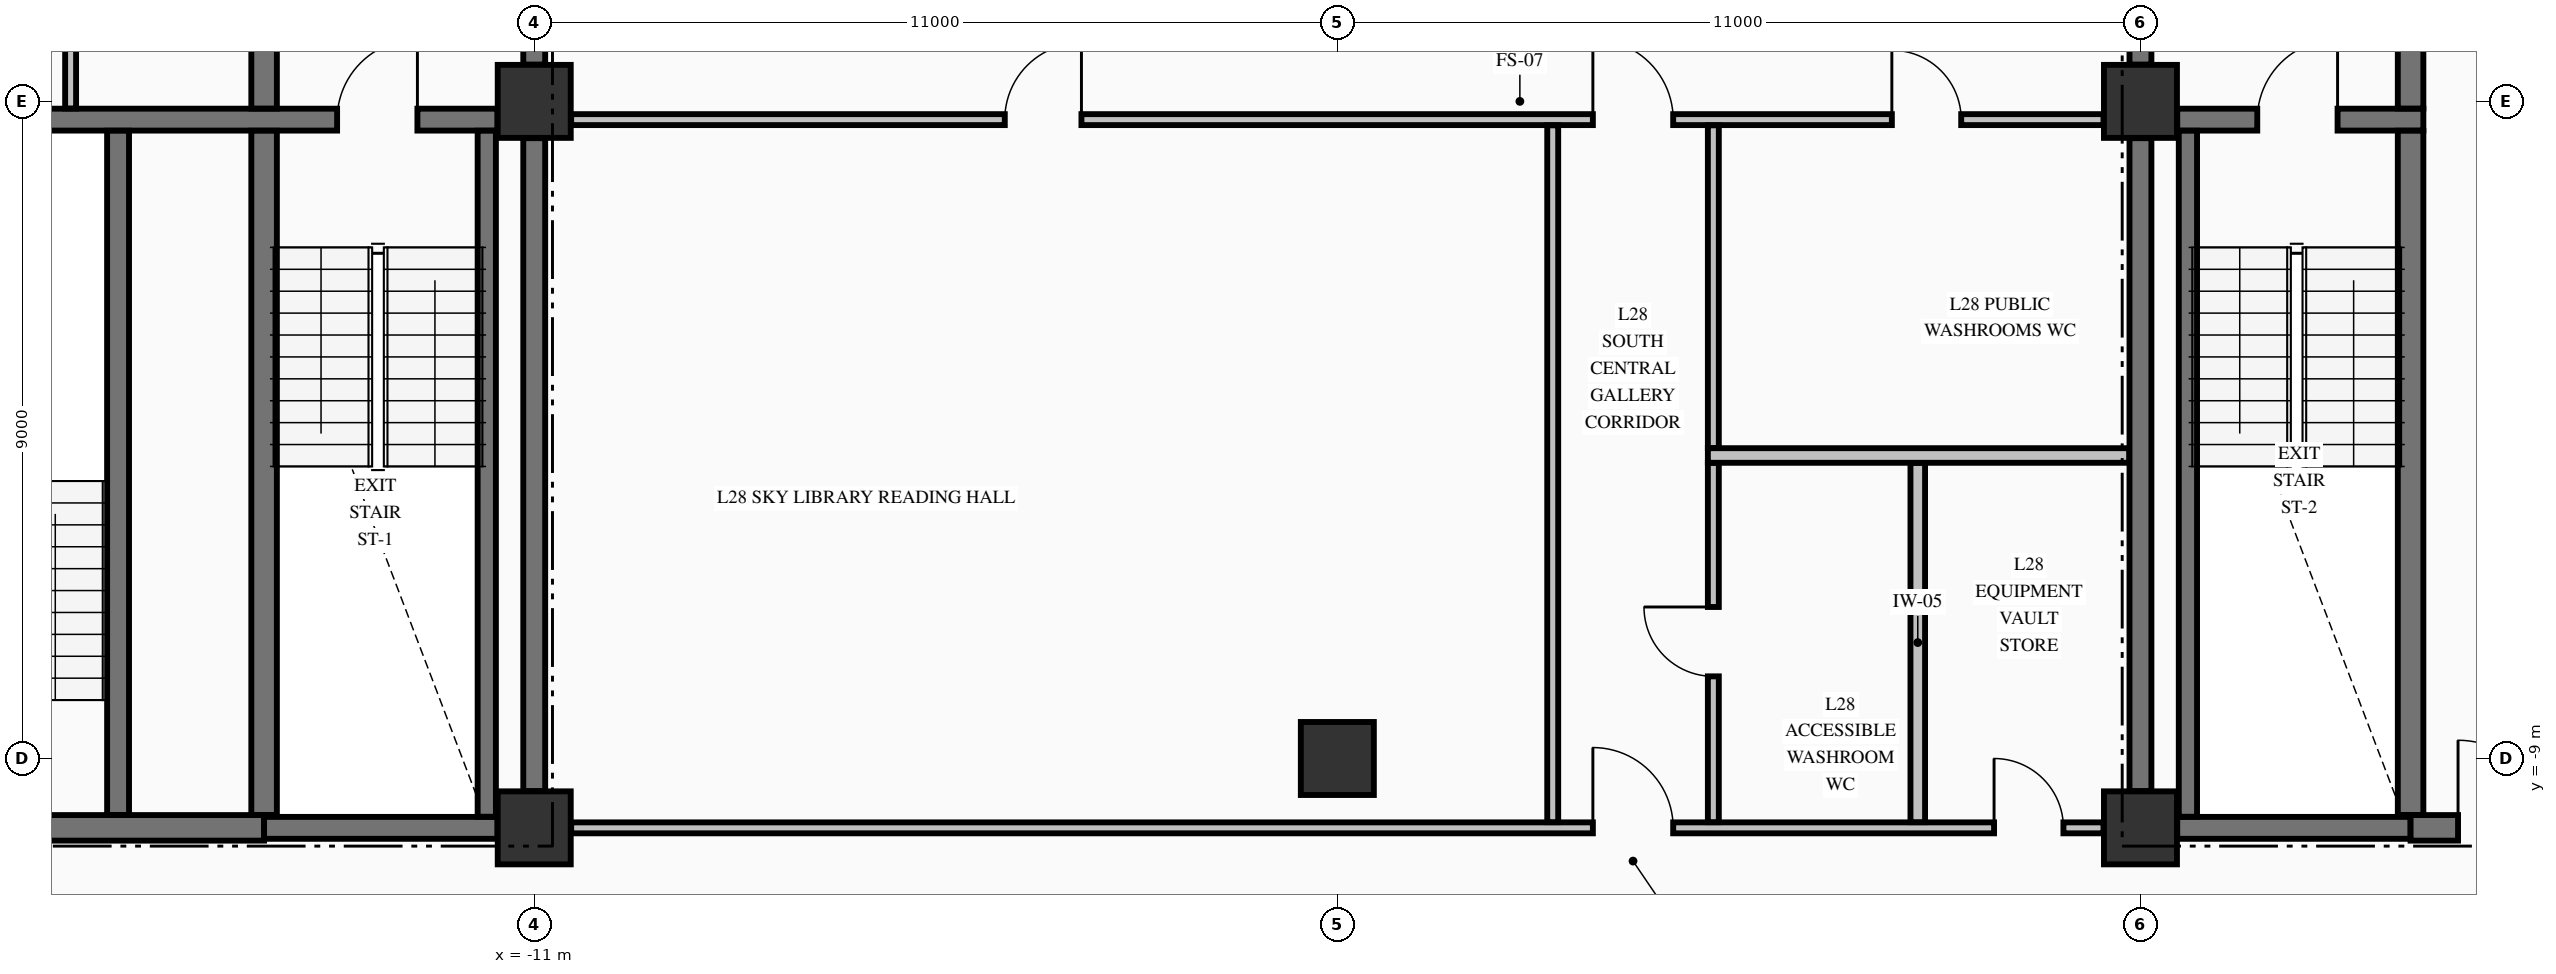
"""IFC4 building model, lengths in metres.
Left out: names, types, materials, properties, quantities, classifications, styles, units other than length and angle.
Written with IfcOpenShell. Run it as: python <this file> out.ifc"""

import sys

from ifc_helpers import new_model, si_unit, direction, frame, frame_2d, origin, origin_2d, place, context, subcontext, project, spatial, rectangle, extrude, element, fill, save


model = new_model("IFC4")
c1 = context("Model", 3, precision=1e-05, world=origin(), true_north=direction((0.0, 1.0)))
c2 = subcontext(c1, "Body", "Model", "MODEL_VIEW")
j1 = project(units=[si_unit("LENGTHUNIT", "METRE"), si_unit("PLANEANGLEUNIT", "RADIAN")], contexts=[c1])
p1 = place(None, origin())
s1 = spatial("IfcSite", under=j1, at=p1, CompositionType="ELEMENT")
p2 = place(p1, origin())
s2 = spatial("IfcBuilding", under=s1, at=p2, CompositionType="ELEMENT")
p3 = place(p2, frame((0.0, 0.0, 112.78)))
s3 = spatial("IfcBuildingStorey", under=s2, at=p3, CompositionType="ELEMENT", Elevation=112.78)
for number, where, z_axis, x_axis in (
    (1, (-11.0, -9.95, -0.25), (0.0, 0.0, 1.0), (1.0, 0.0, 0.0)),
    (2, (-11.0, 0.0, -0.25), (0.0, 0.0, 1.0), (1.0, 0.0, 0.0)),
    (3, (11.0, -9.95, -0.25), (0.0, 0.0, 1.0), (1.0, 0.0, 0.0)),
    (4, (11.0, 0.0, -0.25), (0.0, 0.0, 1.0), (1.0, 0.0, 0.0)),
    (5, (0.0, -9.0, -0.25), (0.0, 0.0, 1.0), (1.0, 0.0, 0.0)),
):
    element("IfcColumn", number, at=place(p3, frame(where, z_axis=z_axis, x_axis=x_axis)), inside=s3, PredefinedType="COLUMN", context=c2, shape_type="SweptSolid", body=[
        extrude(rectangle(XDim=1.0, YDim=1.0, at=origin_2d()), origin(), (0.0, 0.0, 1.0), 3.395),
    ])
p4 = place(p3, frame((-19.496, -9.95, 0.0), z_axis=(0.0, 0.0, 1.0), x_axis=(1.0, 0.0, 0.0)))
e6 = element("IfcWall", 6, at=p4, inside=s3, PredefinedType="SHEAR", context=c2, shape_type="SweptSolid", body=[
    extrude(rectangle(XDim=4.796, YDim=0.35, at=frame_2d((2.398, 0.0))), origin(), (0.0, 0.0, 1.0), 3.145),
])
p5 = place(p4, frame((0.671, 0.0, 0.0)))
e7 = element("IfcOpeningElement", 7, at=p5, cuts=e6, PredefinedType="OPENING", context=c2, shape_type="SweptSolid", body=[
    extrude(rectangle(XDim=1.05, YDim=2.15, at=frame_2d((0.525, 1.075))), frame((0.0, 0.185, 0.0), z_axis=(0.0, -1.0, 0.0), x_axis=(1.0, 0.0, 0.0)), (0.0, 0.0, 1.0), 0.37),
])
for number, where, z_axis, x_axis in (
    (8, (-14.7, -9.95, 0.0), (0.0, 0.0, 1.0), (1.0, 0.0, 0.0)),
    (9, (11.504, -9.95, 0.0), (0.0, 0.0, 1.0), (1.0, 0.0, 0.0)),
):
    element("IfcWall", number, at=place(p3, frame(where, z_axis=z_axis, x_axis=x_axis)), inside=s3, PredefinedType="SHEAR", context=c2, shape_type="SweptSolid", body=[
        extrude(rectangle(XDim=3.196, YDim=0.3, at=frame_2d((1.598, 0.0))), origin(), (0.0, 0.0, 1.0), 3.145),
    ])
p6 = place(p3, frame((14.7, -9.95, 0.0), z_axis=(0.0, 0.0, 1.0), x_axis=(1.0, 0.0, 0.0)))
e10 = element("IfcWall", 10, at=p6, inside=s3, PredefinedType="SHEAR", context=c2, shape_type="SweptSolid", body=[
    extrude(rectangle(XDim=4.796, YDim=0.35, at=frame_2d((2.398, 0.0))), origin(), (0.0, 0.0, 1.0), 3.145),
])
p7 = place(p6, frame((0.65, 0.0, 0.0)))
e11 = element("IfcOpeningElement", 11, at=p7, cuts=e10, PredefinedType="OPENING", context=c2, shape_type="SweptSolid", body=[
    extrude(rectangle(XDim=1.2, YDim=2.15, at=frame_2d((0.6, 1.075))), frame((0.0, 0.185, 0.0), z_axis=(0.0, -1.0, 0.0), x_axis=(1.0, 0.0, 0.0)), (0.0, 0.0, 1.0), 0.37),
])
p8 = place(p3, frame((-19.496, -0.25, 0.0), z_axis=(0.0, 0.0, 1.0), x_axis=(1.0, 0.0, 0.0)))
e12 = element("IfcWall", 12, at=p8, inside=s3, PredefinedType="SHEAR", context=c2, shape_type="SweptSolid", body=[
    extrude(rectangle(XDim=7.992, YDim=0.3, at=frame_2d((3.996, 0.0))), origin(), (0.0, 0.0, 1.0), 3.145),
])
p9 = place(p8, frame((5.796, 0.0, 0.0)))
e13 = element("IfcOpeningElement", 13, at=p9, cuts=e12, PredefinedType="OPENING", context=c2, shape_type="SweptSolid", body=[
    extrude(rectangle(XDim=1.1, YDim=2.15, at=frame_2d((0.55, 1.075))), frame((0.0, 0.16, 0.0), z_axis=(0.0, -1.0, 0.0), x_axis=(1.0, 0.0, 0.0)), (0.0, 0.0, 1.0), 0.32),
])
p10 = place(p3, frame((11.504, -0.25, 0.0), z_axis=(0.0, 0.0, 1.0), x_axis=(1.0, 0.0, 0.0)))
e14 = element("IfcWall", 14, at=p10, inside=s3, PredefinedType="SHEAR", context=c2, shape_type="SweptSolid", body=[
    extrude(rectangle(XDim=3.371, YDim=0.3, at=frame_2d((1.686, 0.0))), origin(), (0.0, 0.0, 1.0), 3.145),
])
p11 = place(p10, frame((1.096, 0.0, 0.0)))
e15 = element("IfcOpeningElement", 15, at=p11, cuts=e14, PredefinedType="OPENING", context=c2, shape_type="SweptSolid", body=[
    extrude(rectangle(XDim=1.1, YDim=2.15, at=frame_2d((0.55, 1.075))), frame((0.0, 0.16, 0.0), z_axis=(0.0, -1.0, 0.0), x_axis=(1.0, 0.0, 0.0)), (0.0, 0.0, 1.0), 0.32),
])
p12 = place(p3, frame((-10.494, -9.95, 0.0), z_axis=(0.0, 0.0, 1.0), x_axis=(1.0, 0.0, 0.0)))
e16 = element("IfcWall", 16, at=p12, inside=s3, PredefinedType="PARTITIONING", context=c2, shape_type="SweptSolid", body=[
    extrude(rectangle(XDim=20.988, YDim=0.15, at=frame_2d((10.494, 0.0))), origin(), (0.0, 0.0, 1.0), 3.145),
])
p13 = place(p12, frame((13.994, 0.0, 0.0)))
e17 = element("IfcOpeningElement", 17, at=p13, cuts=e16, PredefinedType="OPENING", context=c2, shape_type="SweptSolid", body=[
    extrude(rectangle(XDim=1.1, YDim=2.15, at=frame_2d((0.55, 1.075))), frame((0.0, 0.085, 0.0), z_axis=(0.0, -1.0, 0.0), x_axis=(1.0, 0.0, 0.0)), (0.0, 0.0, 1.0), 0.17),
])
p14 = place(p12, frame((19.489, 0.0, 0.0)))
e18 = element("IfcOpeningElement", 18, at=p14, cuts=e16, PredefinedType="OPENING", context=c2, shape_type="SweptSolid", body=[
    extrude(rectangle(XDim=0.95, YDim=2.15, at=frame_2d((0.475, 1.075))), frame((0.0, 0.085, 0.0), z_axis=(0.0, -1.0, 0.0), x_axis=(1.0, 0.0, 0.0)), (0.0, 0.0, 1.0), 0.17),
])
p15 = place(p3, frame((5.075, -4.85, 0.0), z_axis=(0.0, 0.0, 1.0), x_axis=(1.0, 0.0, 0.0)))
e19 = element("IfcWall", 19, at=p15, inside=s3, PredefinedType="PARTITIONING", context=c2, shape_type="SweptSolid", body=[
    extrude(rectangle(XDim=5.772, YDim=0.2, at=frame_2d((2.886, 0.0))), origin(), (0.0, 0.0, 1.0), 3.145),
])
p16 = place(p3, frame((-10.494, -0.25, 0.0), z_axis=(0.0, 0.0, 1.0), x_axis=(1.0, 0.0, 0.0)))
e20 = element("IfcWall", 20, at=p16, inside=s3, PredefinedType="PARTITIONING", context=c2, shape_type="SweptSolid", body=[
    extrude(rectangle(XDim=20.988, YDim=0.15, at=frame_2d((10.494, 0.0))), origin(), (0.0, 0.0, 1.0), 3.145),
])
p17 = place(p16, frame((13.994, 0.0, 0.0)))
e21 = element("IfcOpeningElement", 21, at=p17, cuts=e20, PredefinedType="OPENING", context=c2, shape_type="SweptSolid", body=[
    extrude(rectangle(XDim=1.1, YDim=2.15, at=frame_2d((0.55, 1.075))), frame((0.0, 0.085, 0.0), z_axis=(0.0, -1.0, 0.0), x_axis=(1.0, 0.0, 0.0)), (0.0, 0.0, 1.0), 0.17),
])
p18 = place(p16, frame((5.939, 0.0, 0.0)))
e22 = element("IfcOpeningElement", 22, at=p18, cuts=e20, PredefinedType="OPENING", context=c2, shape_type="SweptSolid", body=[
    extrude(rectangle(XDim=1.05, YDim=2.15, at=frame_2d((0.525, 1.075))), frame((0.0, 0.085, 0.0), z_axis=(0.0, -1.0, 0.0), x_axis=(1.0, 0.0, 0.0)), (0.0, 0.0, 1.0), 0.17),
])
p19 = place(p16, frame((18.089, 0.0, 0.0)))
e23 = element("IfcOpeningElement", 23, at=p19, cuts=e20, PredefinedType="OPENING", context=c2, shape_type="SweptSolid", body=[
    extrude(rectangle(XDim=0.95, YDim=2.15, at=frame_2d((0.475, 1.075))), frame((0.0, 0.085, 0.0), z_axis=(0.0, -1.0, 0.0), x_axis=(1.0, 0.0, 0.0)), (0.0, 0.0, 1.0), 0.17),
])
p20 = place(p3, frame((-16.7, -9.773, 0.0), z_axis=(0.0, 0.0, 1.0), x_axis=(0.0, 1.0, 0.0)))
e24 = element("IfcWall", 24, at=p20, inside=s3, PredefinedType="SHEAR", context=c2, shape_type="SweptSolid", body=[
    extrude(rectangle(XDim=9.371, YDim=0.3, at=frame_2d((4.686, 0.0))), origin(), (0.0, 0.0, 1.0), 3.145),
])
p21 = place(p3, frame((-14.7, -9.773, 0.0), z_axis=(0.0, 0.0, 1.0), x_axis=(0.0, 1.0, 0.0)))
e25 = element("IfcWall", 25, at=p21, inside=s3, PredefinedType="SHEAR", context=c2, shape_type="SweptSolid", body=[
    extrude(rectangle(XDim=9.371, YDim=0.35, at=frame_2d((4.686, 0.0))), origin(), (0.0, 0.0, 1.0), 3.145),
])
p22 = place(p3, frame((-14.7, -0.098, 0.0), z_axis=(0.0, 0.0, 1.0), x_axis=(0.0, 1.0, 0.0)))
e26 = element("IfcWall", 26, at=p22, inside=s3, PredefinedType="SHEAR", context=c2, shape_type="SweptSolid", body=[
    extrude(rectangle(XDim=2.846, YDim=0.35, at=frame_2d((1.423, 0.0))), origin(), (0.0, 0.0, 1.0), 3.145),
])
p23 = place(p3, frame((-11.65, -9.798, 0.0), z_axis=(0.0, 0.0, 1.0), x_axis=(0.0, 1.0, 0.0)))
e27 = element("IfcWall", 27, at=p23, inside=s3, PredefinedType="SOLIDWALL", context=c2, shape_type="SweptSolid", body=[
    extrude(rectangle(XDim=9.396, YDim=0.25, at=frame_2d((4.698, 0.0))), origin(), (0.0, 0.0, 1.0), 3.145),
])
p24 = place(p3, frame((-11.0, -9.446, 0.0), z_axis=(0.0, 0.0, 1.0), x_axis=(0.0, 1.0, 0.0)))
e28 = element("IfcWall", 28, at=p24, inside=s3, PredefinedType="SHEAR", context=c2, shape_type="SweptSolid", body=[
    extrude(rectangle(XDim=8.942, YDim=0.3, at=frame_2d((4.471, 0.0))), origin(), (0.0, 0.0, 1.0), 3.145),
])
p25 = place(p3, frame((-11.0, 0.504, 0.0), z_axis=(0.0, 0.0, 1.0), x_axis=(0.0, 1.0, 0.0)))
e29 = element("IfcWall", 29, at=p25, inside=s3, PredefinedType="SHEAR", context=c2, shape_type="SweptSolid", body=[
    extrude(rectangle(XDim=2.244, YDim=0.3, at=frame_2d((1.122, 0.0))), origin(), (0.0, 0.0, 1.0), 3.145),
])
p26 = place(p25, frame((0.596, 0.0, 0.0)))
e30 = element("IfcOpeningElement", 30, at=p26, cuts=e29, PredefinedType="OPENING", context=c2, shape_type="SweptSolid", body=[
    extrude(rectangle(XDim=1.1, YDim=2.15, at=frame_2d((0.55, 1.075))), frame((0.0, 0.16, 0.0), z_axis=(0.0, -1.0, 0.0), x_axis=(1.0, 0.0, 0.0)), (0.0, 0.0, 1.0), 0.32),
])
p27 = place(p3, frame((11.0, -9.446, 0.0), z_axis=(0.0, 0.0, 1.0), x_axis=(0.0, 1.0, 0.0)))
e31 = element("IfcWall", 31, at=p27, inside=s3, PredefinedType="SHEAR", context=c2, shape_type="SweptSolid", body=[
    extrude(rectangle(XDim=8.942, YDim=0.3, at=frame_2d((4.471, 0.0))), origin(), (0.0, 0.0, 1.0), 3.145),
])
p28 = place(p3, frame((11.0, 0.504, 0.0), z_axis=(0.0, 0.0, 1.0), x_axis=(0.0, 1.0, 0.0)))
e32 = element("IfcWall", 32, at=p28, inside=s3, PredefinedType="SHEAR", context=c2, shape_type="SweptSolid", body=[
    extrude(rectangle(XDim=2.244, YDim=0.3, at=frame_2d((1.122, 0.0))), origin(), (0.0, 0.0, 1.0), 3.145),
])
p29 = place(p28, frame((0.596, 0.0, 0.0)))
e33 = element("IfcOpeningElement", 33, at=p29, cuts=e32, PredefinedType="OPENING", context=c2, shape_type="SweptSolid", body=[
    extrude(rectangle(XDim=1.1, YDim=2.15, at=frame_2d((0.55, 1.075))), frame((0.0, 0.16, 0.0), z_axis=(0.0, -1.0, 0.0), x_axis=(1.0, 0.0, 0.0)), (0.0, 0.0, 1.0), 0.32),
])
p30 = place(p3, frame((11.65, -9.798, 0.0), z_axis=(0.0, 0.0, 1.0), x_axis=(0.0, 1.0, 0.0)))
e34 = element("IfcWall", 34, at=p30, inside=s3, PredefinedType="SOLIDWALL", context=c2, shape_type="SweptSolid", body=[
    extrude(rectangle(XDim=9.396, YDim=0.25, at=frame_2d((4.698, 0.0))), origin(), (0.0, 0.0, 1.0), 3.145),
])
p31 = place(p3, frame((14.7, -9.773, 0.0), z_axis=(0.0, 0.0, 1.0), x_axis=(0.0, 1.0, 0.0)))
e35 = element("IfcWall", 35, at=p31, inside=s3, PredefinedType="SHEAR", context=c2, shape_type="SweptSolid", body=[
    extrude(rectangle(XDim=9.371, YDim=0.35, at=frame_2d((4.686, 0.0))), origin(), (0.0, 0.0, 1.0), 3.145),
])
p32 = place(p3, frame((14.7, -0.098, 0.0), z_axis=(0.0, 0.0, 1.0), x_axis=(0.0, 1.0, 0.0)))
e36 = element("IfcWall", 36, at=p32, inside=s3, PredefinedType="SHEAR", context=c2, shape_type="SweptSolid", body=[
    extrude(rectangle(XDim=2.846, YDim=0.35, at=frame_2d((1.423, 0.0))), origin(), (0.0, 0.0, 1.0), 3.145),
])
p33 = place(p3, frame((-17.35, -0.097, 0.0), z_axis=(0.0, 0.0, 1.0), x_axis=(0.0, 1.0, 0.0)))
e37 = element("IfcWall", 37, at=p33, inside=s3, PredefinedType="PARTITIONING", context=c2, shape_type="SweptSolid", body=[
    extrude(rectangle(XDim=5.119, YDim=0.15, at=frame_2d((2.56, 0.0))), origin(), (0.0, 0.0, 1.0), 3.145),
])
p34 = place(p3, frame((2.95, -9.872, 0.0), z_axis=(0.0, 0.0, 1.0), x_axis=(0.0, 1.0, 0.0)))
e38 = element("IfcWall", 38, at=p34, inside=s3, PredefinedType="PARTITIONING", context=c2, shape_type="SweptSolid", body=[
    extrude(rectangle(XDim=9.544, YDim=0.15, at=frame_2d((4.772, 0.0))), origin(), (0.0, 0.0, 1.0), 3.145),
])
p35 = place(p3, frame((5.15, -9.872, 0.0), z_axis=(0.0, 0.0, 1.0), x_axis=(0.0, 1.0, 0.0)))
e39 = element("IfcWall", 39, at=p35, inside=s3, PredefinedType="PARTITIONING", context=c2, shape_type="SweptSolid", body=[
    extrude(rectangle(XDim=4.919, YDim=0.15, at=frame_2d((2.459, 0.0))), origin(), (0.0, 0.0, 1.0), 3.145),
])
p36 = place(p35, frame((1.997, 0.0, 0.0)))
e40 = element("IfcOpeningElement", 40, at=p36, cuts=e39, PredefinedType="OPENING", context=c2, shape_type="SweptSolid", body=[
    extrude(rectangle(XDim=0.95, YDim=2.15, at=frame_2d((0.475, 1.075))), frame((0.0, 0.085, 0.0), z_axis=(0.0, -1.0, 0.0), x_axis=(1.0, 0.0, 0.0)), (0.0, 0.0, 1.0), 0.17),
])
p37 = place(p3, frame((5.15, -4.747, 0.0), z_axis=(0.0, 0.0, 1.0), x_axis=(0.0, 1.0, 0.0)))
e41 = element("IfcWall", 41, at=p37, inside=s3, PredefinedType="PARTITIONING", context=c2, shape_type="SweptSolid", body=[
    extrude(rectangle(XDim=4.419, YDim=0.15, at=frame_2d((2.209, 0.0))), origin(), (0.0, 0.0, 1.0), 3.145),
])
p38 = place(p3, frame((7.95, -9.872, 0.0), z_axis=(0.0, 0.0, 1.0), x_axis=(0.0, 1.0, 0.0)))
e42 = element("IfcWall", 42, at=p38, inside=s3, PredefinedType="PARTITIONING", context=c2, shape_type="SweptSolid", body=[
    extrude(rectangle(XDim=4.919, YDim=0.2, at=frame_2d((2.459, 0.0))), origin(), (0.0, 0.0, 1.0), 3.145),
])
p39 = place(p9, origin())
e43 = element("IfcDoor", 43, at=p39, inside=s3, OperationType="SINGLE_SWING_RIGHT", PredefinedType="DOOR", context=c2, shape_type="SweptSolid", body=[
    extrude(rectangle(XDim=1.1, YDim=2.15, at=frame_2d((0.55, 1.075))), frame((0.0, 0.025, 0.0), z_axis=(0.0, -1.0, 0.0), x_axis=(1.0, 0.0, 0.0)), (0.0, 0.0, 1.0), 0.05),
])
fill(e13, e43)
p40 = place(p11, origin())
e44 = element("IfcDoor", 44, at=p40, inside=s3, OperationType="SINGLE_SWING_RIGHT", PredefinedType="DOOR", context=c2, shape_type="SweptSolid", body=[
    extrude(rectangle(XDim=1.1, YDim=2.15, at=frame_2d((0.55, 1.075))), frame((0.0, 0.025, 0.0), z_axis=(0.0, -1.0, 0.0), x_axis=(1.0, 0.0, 0.0)), (0.0, 0.0, 1.0), 0.05),
])
fill(e15, e44)
p41 = place(p7, origin())
e45 = element("IfcDoor", 45, at=p41, inside=s3, OperationType="SINGLE_SWING_LEFT", PredefinedType="DOOR", context=c2, shape_type="SweptSolid", body=[
    extrude(rectangle(XDim=1.2, YDim=2.15, at=frame_2d((0.6, 1.075))), frame((0.0, 0.025, 0.0), z_axis=(0.0, -1.0, 0.0), x_axis=(1.0, 0.0, 0.0)), (0.0, 0.0, 1.0), 0.05),
])
fill(e11, e45)
p42 = place(p13, origin())
e46 = element("IfcDoor", 46, at=p42, inside=s3, OperationType="SINGLE_SWING_LEFT", PredefinedType="DOOR", context=c2, shape_type="SweptSolid", body=[
    extrude(rectangle(XDim=1.1, YDim=2.15, at=frame_2d((0.55, 1.075))), frame((0.0, 0.025, 0.0), z_axis=(0.0, -1.0, 0.0), x_axis=(1.0, 0.0, 0.0)), (0.0, 0.0, 1.0), 0.05),
])
fill(e17, e46)
p43 = place(p17, origin())
e47 = element("IfcDoor", 47, at=p43, inside=s3, OperationType="SINGLE_SWING_LEFT", PredefinedType="DOOR", context=c2, shape_type="SweptSolid", body=[
    extrude(rectangle(XDim=1.1, YDim=2.15, at=frame_2d((0.55, 1.075))), frame((0.0, 0.025, 0.0), z_axis=(0.0, -1.0, 0.0), x_axis=(1.0, 0.0, 0.0)), (0.0, 0.0, 1.0), 0.05),
])
fill(e21, e47)
p44 = place(p18, origin())
e48 = element("IfcDoor", 48, at=p44, inside=s3, OperationType="SINGLE_SWING_RIGHT", PredefinedType="DOOR", context=c2, shape_type="SweptSolid", body=[
    extrude(rectangle(XDim=1.05, YDim=2.15, at=frame_2d((0.525, 1.075))), frame((0.0, 0.025, 0.0), z_axis=(0.0, -1.0, 0.0), x_axis=(1.0, 0.0, 0.0)), (0.0, 0.0, 1.0), 0.05),
])
fill(e22, e48)
p45 = place(p19, origin())
e49 = element("IfcDoor", 49, at=p45, inside=s3, OperationType="SINGLE_SWING_LEFT", PredefinedType="DOOR", context=c2, shape_type="SweptSolid", body=[
    extrude(rectangle(XDim=0.95, YDim=2.15, at=frame_2d((0.475, 1.075))), frame((0.0, 0.025, 0.0), z_axis=(0.0, -1.0, 0.0), x_axis=(1.0, 0.0, 0.0)), (0.0, 0.0, 1.0), 0.05),
])
fill(e23, e49)
p46 = place(p36, origin())
e50 = element("IfcDoor", 50, at=p46, inside=s3, OperationType="SINGLE_SWING_RIGHT", PredefinedType="DOOR", context=c2, shape_type="SweptSolid", body=[
    extrude(rectangle(XDim=0.95, YDim=2.15, at=frame_2d((0.475, 1.075))), frame((0.0, 0.025, 0.0), z_axis=(0.0, -1.0, 0.0), x_axis=(1.0, 0.0, 0.0)), (0.0, 0.0, 1.0), 0.05),
])
fill(e40, e50)
p47 = place(p14, origin())
e51 = element("IfcDoor", 51, at=p47, inside=s3, OperationType="SINGLE_SWING_LEFT", PredefinedType="DOOR", context=c2, shape_type="SweptSolid", body=[
    extrude(rectangle(XDim=0.95, YDim=2.15, at=frame_2d((0.475, 1.075))), frame((0.0, 0.025, 0.0), z_axis=(0.0, -1.0, 0.0), x_axis=(1.0, 0.0, 0.0)), (0.0, 0.0, 1.0), 0.05),
])
fill(e18, e51)
save(model, sys.argv[1])
